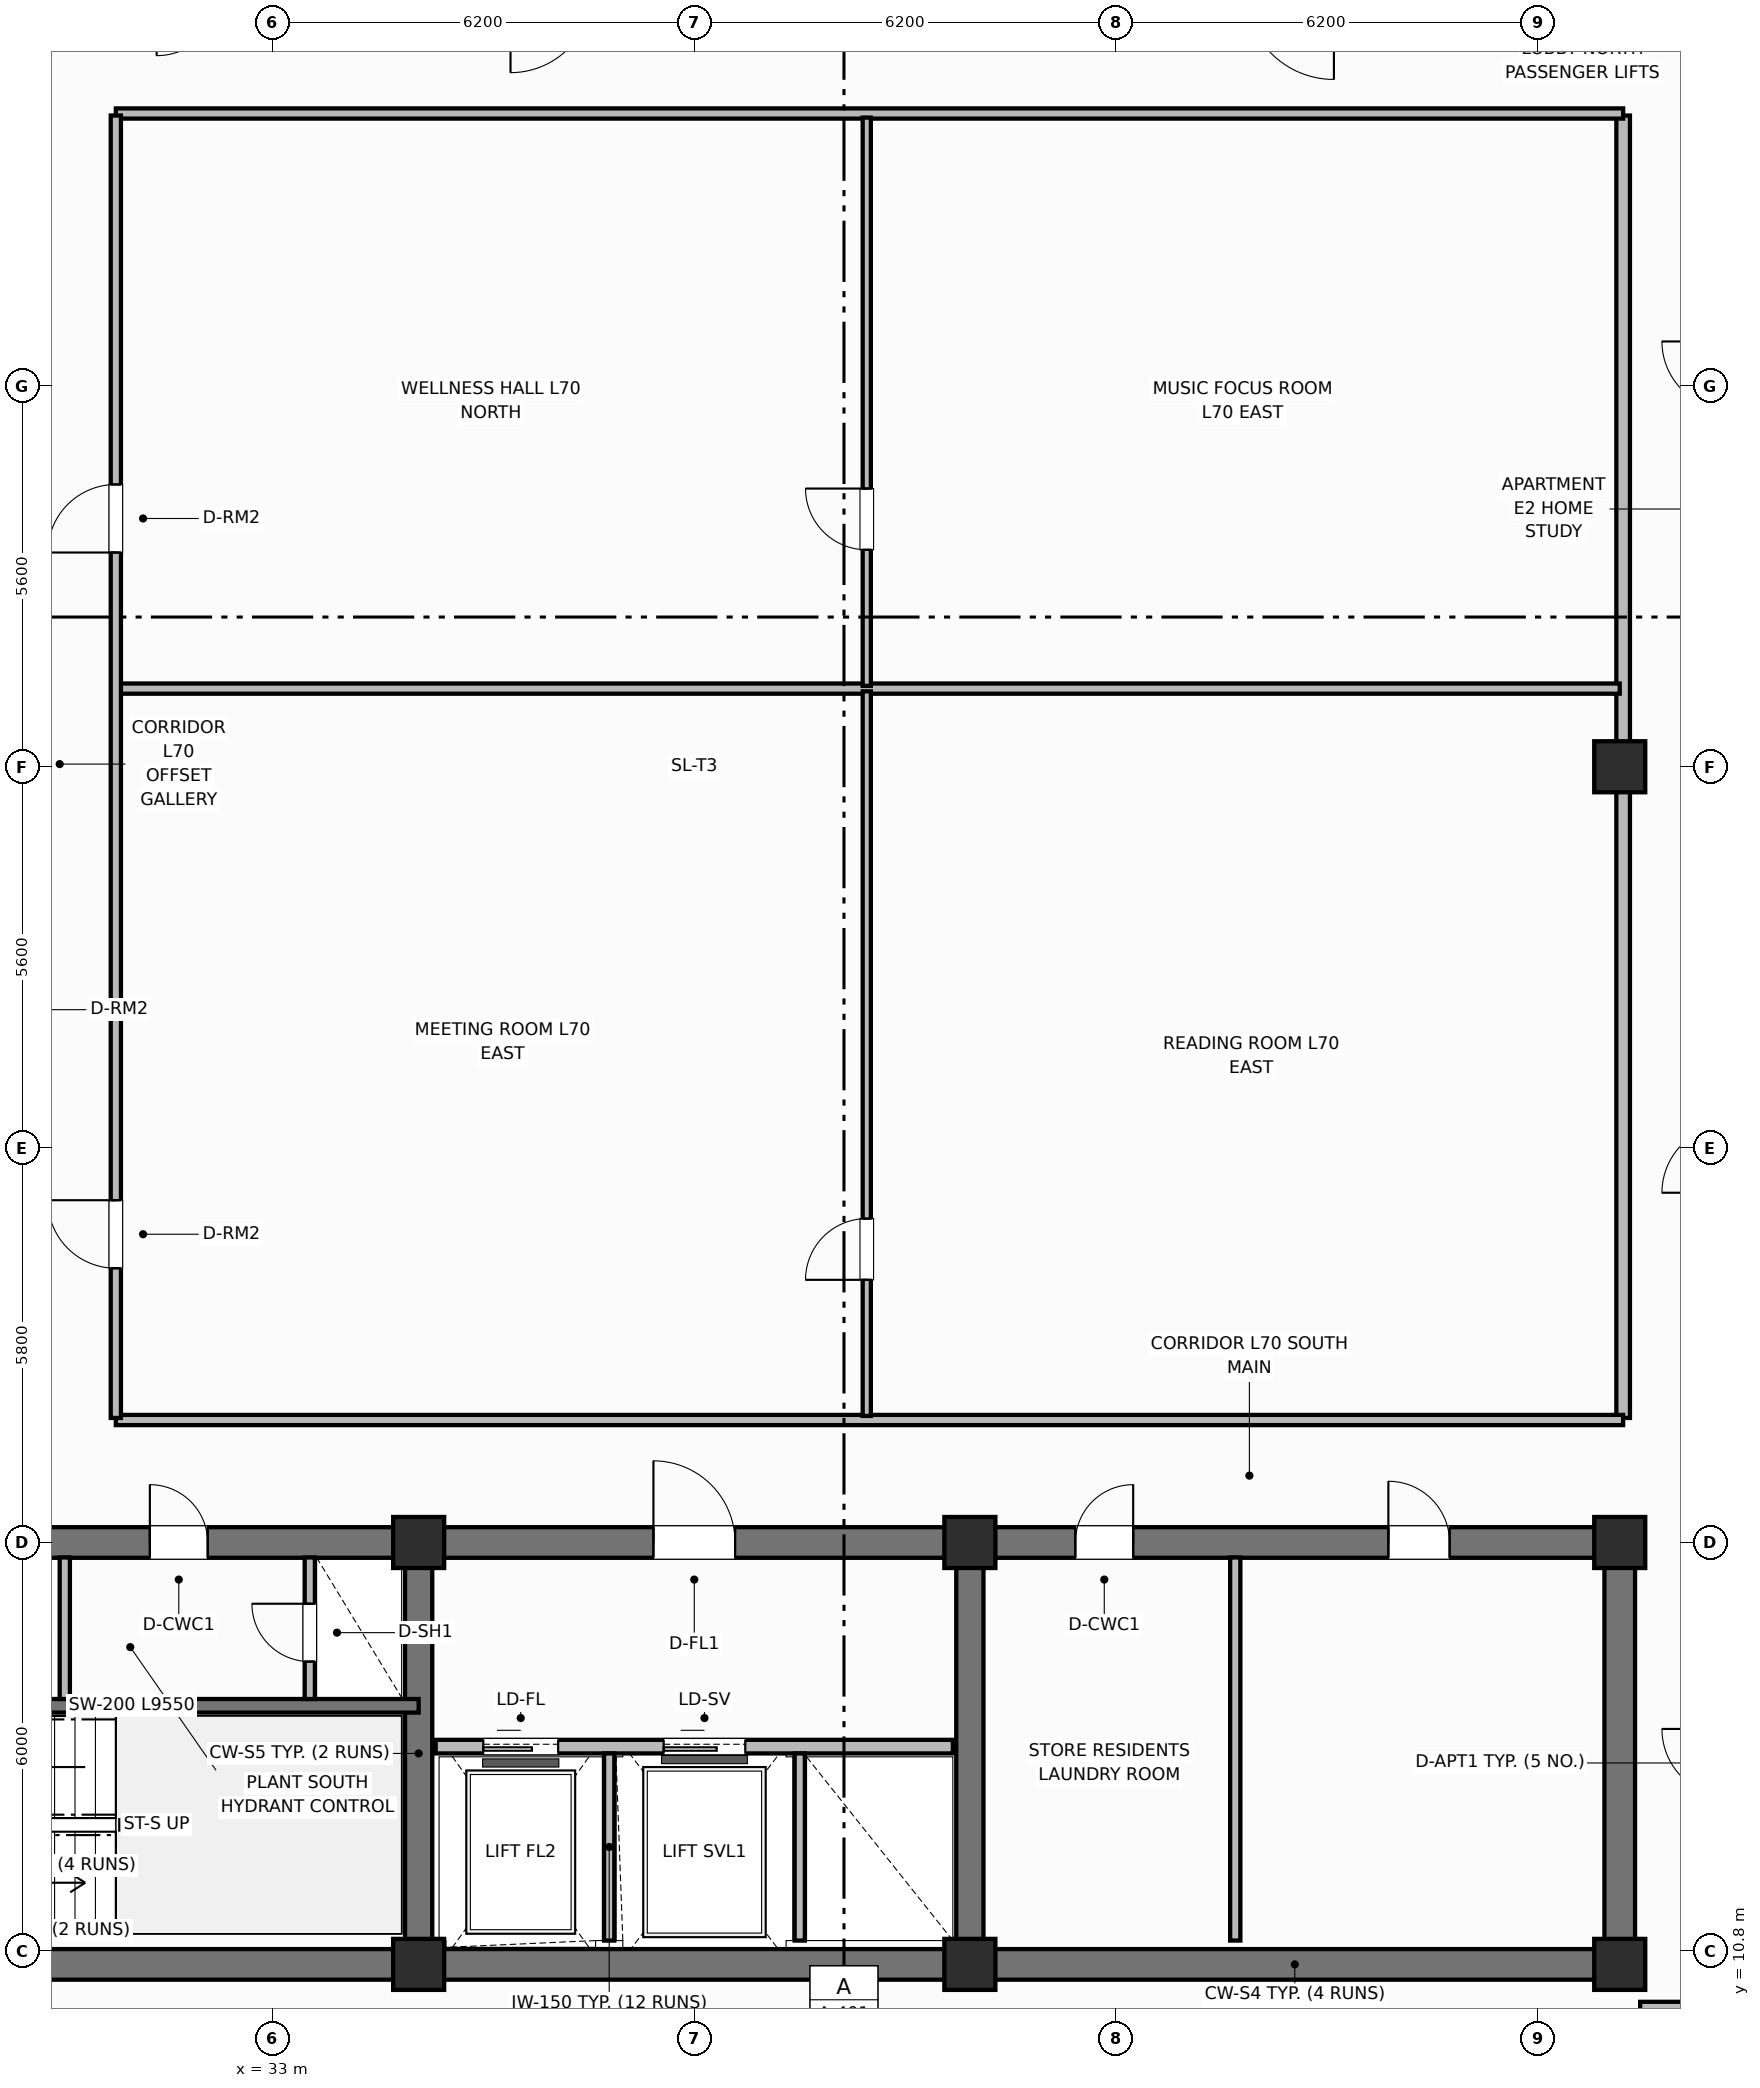
"""IFC4 building model, lengths in metres.
Left out: names, types, materials, properties, quantities, classifications, styles, units other than length and angle.
Written with IfcOpenShell. Run it as: python <this file> out.ifc"""

import sys

from ifc_helpers import new_model, si_unit, direction, frame, frame_2d, origin, origin_2d, place, context, subcontext, project, spatial, rectangle, extrude, element, fill, save


model = new_model("IFC4")
c1 = context("Model", 3, precision=1e-05, world=origin(), true_north=direction((0.0, 1.0)))
c2 = subcontext(c1, "Body", "Model", "MODEL_VIEW")
j1 = project(units=[si_unit("LENGTHUNIT", "METRE"), si_unit("PLANEANGLEUNIT", "RADIAN")], contexts=[c1])
p1 = place(None, origin())
s1 = spatial("IfcSite", under=j1, at=p1, CompositionType="ELEMENT")
p2 = place(p1, origin())
s2 = spatial("IfcBuilding", under=s1, at=p2, CompositionType="ELEMENT")
p3 = place(p2, frame((0.0, 0.0, 278.7)))
s3 = spatial("IfcBuildingStorey", under=s2, at=p3, CompositionType="ELEMENT", Elevation=278.7)
p4 = place(p3, frame((52.8, 10.6, 0.0), z_axis=(0.0, 0.0, 1.0), x_axis=(-1.0, 0.0, 0.0)))
e1 = element("IfcWall", 1, at=p4, inside=s3, PredefinedType="SHEAR", context=c2, shape_type="SweptSolid", body=[
    extrude(rectangle(XDim=27.2, YDim=0.45, at=frame_2d((13.6, 0.0))), origin(), (0.0, 0.0, 1.0), 3.7),
])
p5 = place(p3, frame((52.8, 10.825, 0.0), z_axis=(0.0, 0.0, 1.0), x_axis=(0.0, 1.0, 0.0)))
e2 = element("IfcWall", 2, at=p5, inside=s3, PredefinedType="SHEAR", context=c2, shape_type="SweptSolid", body=[
    extrude(rectangle(XDim=5.75, YDim=0.45, at=frame_2d((2.875, 0.0))), origin(), (0.0, 0.0, 1.0), 3.7),
])
p6 = place(p3, frame((25.6, 16.8, 0.0), z_axis=(0.0, 0.0, 1.0), x_axis=(1.0, 0.0, 0.0)))
e3 = element("IfcWall", 3, at=p6, inside=s3, PredefinedType="SHEAR", context=c2, shape_type="SweptSolid", body=[
    extrude(rectangle(XDim=27.2, YDim=0.45, at=frame_2d((13.6, 0.0))), origin(), (0.0, 0.0, 1.0), 3.7),
])
p7 = place(p6, frame((1.8, 0.0, 0.0)))
e4 = element("IfcOpeningElement", 4, at=p7, cuts=e3, PredefinedType="OPENING", context=c2, shape_type="SweptSolid", body=[
    extrude(rectangle(XDim=1.1, YDim=2.15, at=frame_2d((0.55, 1.075))), frame((0.0, 0.235, 0.0), z_axis=(0.0, -1.0, 0.0), x_axis=(1.0, 0.0, 0.0)), (0.0, 0.0, 1.0), 0.47),
])
p8 = place(p6, frame((5.6, 0.0, 0.0)))
e5 = element("IfcOpeningElement", 5, at=p8, cuts=e3, PredefinedType="OPENING", context=c2, shape_type="SweptSolid", body=[
    extrude(rectangle(XDim=0.85, YDim=2.1, at=frame_2d((0.425, 1.05))), frame((0.0, 0.235, 0.0), z_axis=(0.0, -1.0, 0.0), x_axis=(1.0, 0.0, 0.0)), (0.0, 0.0, 1.0), 0.47),
])
p9 = place(p6, frame((13.0, 0.0, 0.0)))
e6 = element("IfcOpeningElement", 6, at=p9, cuts=e3, PredefinedType="OPENING", context=c2, shape_type="SweptSolid", body=[
    extrude(rectangle(XDim=1.2, YDim=2.15, at=frame_2d((0.6, 1.075))), frame((0.0, 0.235, 0.0), z_axis=(0.0, -1.0, 0.0), x_axis=(1.0, 0.0, 0.0)), (0.0, 0.0, 1.0), 0.47),
])
p10 = place(p6, frame((19.2, 0.0, 0.0)))
e7 = element("IfcOpeningElement", 7, at=p10, cuts=e3, PredefinedType="OPENING", context=c2, shape_type="SweptSolid", body=[
    extrude(rectangle(XDim=0.85, YDim=2.1, at=frame_2d((0.425, 1.05))), frame((0.0, 0.235, 0.0), z_axis=(0.0, -1.0, 0.0), x_axis=(1.0, 0.0, 0.0)), (0.0, 0.0, 1.0), 0.47),
])
p11 = place(p6, frame((23.8, 0.0, 0.0)))
e8 = element("IfcOpeningElement", 8, at=p11, cuts=e3, PredefinedType="OPENING", context=c2, shape_type="SweptSolid", body=[
    extrude(rectangle(XDim=0.9, YDim=2.1, at=frame_2d((0.45, 1.05))), frame((0.0, 0.235, 0.0), z_axis=(0.0, -1.0, 0.0), x_axis=(1.0, 0.0, 0.0)), (0.0, 0.0, 1.0), 0.47),
])
for number, where, z_axis, x_axis in (
    (9, (35.15, 10.825, 0.0), (0.0, 0.0, 1.0), (0.0, 1.0, 0.0)),
    (10, (43.25, 10.825, 0.0), (0.0, 0.0, 1.0), (0.0, 1.0, 0.0)),
):
    element("IfcWall", number, at=place(p3, frame(where, z_axis=z_axis, x_axis=x_axis)), inside=s3, PredefinedType="SHEAR", context=c2, shape_type="SweptSolid", body=[
        extrude(rectangle(XDim=5.75, YDim=0.4, at=frame_2d((2.875, 0.0))), origin(), (0.0, 0.0, 1.0), 3.7),
    ])
for number, where, z_axis, x_axis in (
    (11, (35.15, 10.6, 0.0), (0.0, 0.0, 1.0), (1.0, 0.0, 0.0)),
    (12, (35.15, 16.8, 0.0), (0.0, 0.0, 1.0), (1.0, 0.0, 0.0)),
    (13, (43.25, 10.6, 0.0), (0.0, 0.0, 1.0), (1.0, 0.0, 0.0)),
    (14, (43.25, 16.8, 0.0), (0.0, 0.0, 1.0), (1.0, 0.0, 0.0)),
    (15, (52.8, 10.6, 0.0), (0.0, 0.0, 1.0), (1.0, 0.0, 0.0)),
    (16, (52.8, 16.8, 0.0), (0.0, 0.0, 1.0), (1.0, 0.0, 0.0)),
    (17, (52.8, 28.2, 0.0), (0.0, 0.0, 1.0), (1.0, 0.0, 0.0)),
):
    element("IfcColumn", number, at=place(p3, frame(where, z_axis=z_axis, x_axis=x_axis)), inside=s3, PredefinedType="COLUMN", context=c2, shape_type="SweptSolid", body=[
        extrude(rectangle(XDim=0.75, YDim=0.75, at=origin_2d()), origin(), (0.0, 0.0, 1.0), 3.7),
    ])
p12 = place(p3, frame((25.6, 14.4, 0.0), z_axis=(0.0, 0.0, 1.0), x_axis=(1.0, 0.0, 0.0)))
e18 = element("IfcWall", 18, at=p12, inside=s3, PredefinedType="SHEAR", context=c2, shape_type="SweptSolid", body=[
    extrude(rectangle(XDim=9.55, YDim=0.2, at=frame_2d((4.775, 0.0))), origin(), (0.0, 0.0, 1.0), 3.7),
])
p13 = place(p12, frame((1.05, 0.0, 0.0)))
e19 = element("IfcOpeningElement", 19, at=p13, cuts=e18, PredefinedType="OPENING", context=c2, shape_type="SweptSolid", body=[
    extrude(rectangle(XDim=1.1, YDim=2.15, at=frame_2d((0.55, 1.075))), frame((0.0, 0.11, 0.0), z_axis=(0.0, -1.0, 0.0), x_axis=(1.0, 0.0, 0.0)), (0.0, 0.0, 1.0), 0.22),
])
p14 = place(p3, frame((29.95, 14.5, 0.0), z_axis=(0.0, 0.0, 1.0), x_axis=(0.0, 1.0, 0.0)))
e20 = element("IfcWall", 20, at=p14, inside=s3, PredefinedType="PARTITIONING", context=c2, shape_type="SweptSolid", body=[
    extrude(rectangle(XDim=2.08, YDim=0.15, at=frame_2d((1.04, 0.0))), origin(), (0.0, 0.0, 1.0), 2.56),
])
p15 = place(p3, frame((33.55, 14.5, 0.0), z_axis=(0.0, 0.0, 1.0), x_axis=(0.0, 1.0, 0.0)))
e21 = element("IfcWall", 21, at=p15, inside=s3, PredefinedType="PARTITIONING", context=c2, shape_type="SweptSolid", body=[
    extrude(rectangle(XDim=2.08, YDim=0.15, at=frame_2d((1.04, 0.0))), origin(), (0.0, 0.0, 1.0), 2.56),
])
p16 = place(p15, frame((0.55, 0.0, 0.0)))
e22 = element("IfcOpeningElement", 22, at=p16, cuts=e21, PredefinedType="OPENING", context=c2, shape_type="SweptSolid", body=[
    extrude(rectangle(XDim=0.85, YDim=2.05, at=frame_2d((0.425, 1.025))), frame((0.0, 0.085, 0.0), z_axis=(0.0, -1.0, 0.0), x_axis=(1.0, 0.0, 0.0)), (0.0, 0.0, 1.0), 0.17),
])
p17 = place(p3, frame((35.4, 13.8, 0.0), z_axis=(0.0, 0.0, 1.0), x_axis=(1.0, 0.0, 0.0)))
e23 = element("IfcWall", 23, at=p17, inside=s3, PredefinedType="PARTITIONING", context=c2, shape_type="SweptSolid", body=[
    extrude(rectangle(XDim=7.6, YDim=0.2, at=frame_2d((3.8, 0.0))), origin(), (0.0, 0.0, 1.0), 2.33),
])
p18 = place(p17, frame((0.7, 0.0, 0.0)))
e24 = element("IfcOpeningElement", 24, at=p18, cuts=e23, PredefinedType="OPENING", context=c2, shape_type="SweptSolid", body=[
    extrude(rectangle(XDim=1.1, YDim=2.15, at=frame_2d((0.55, 1.075))), frame((0.0, 0.11, 0.0), z_axis=(0.0, -1.0, 0.0), x_axis=(1.0, 0.0, 0.0)), (0.0, 0.0, 1.0), 0.22),
])
p19 = place(p17, frame((3.35, 0.0, 0.0)))
e25 = element("IfcOpeningElement", 25, at=p19, cuts=e23, PredefinedType="OPENING", context=c2, shape_type="SweptSolid", body=[
    extrude(rectangle(XDim=1.2, YDim=2.15, at=frame_2d((0.6, 1.075))), frame((0.0, 0.11, 0.0), z_axis=(0.0, -1.0, 0.0), x_axis=(1.0, 0.0, 0.0)), (0.0, 0.0, 1.0), 0.22),
])
for number, where, z_axis, x_axis in (
    (26, (37.95, 10.95, 0.0), (0.0, 0.0, 1.0), (0.0, 1.0, 0.0)),
    (27, (40.75, 10.95, 0.0), (0.0, 0.0, 1.0), (0.0, 1.0, 0.0)),
):
    element("IfcWall", number, at=place(p3, frame(where, z_axis=z_axis, x_axis=x_axis)), inside=s3, PredefinedType="PARTITIONING", context=c2, shape_type="SweptSolid", body=[
        extrude(rectangle(XDim=2.75, YDim=0.15, at=frame_2d((1.375, 0.0))), origin(), (0.0, 0.0, 1.0), 2.56),
    ])
p20 = place(p3, frame((47.15, 10.95, 0.0), z_axis=(0.0, 0.0, 1.0), x_axis=(0.0, 1.0, 0.0)))
e28 = element("IfcWall", 28, at=p20, inside=s3, PredefinedType="PARTITIONING", context=c2, shape_type="SweptSolid", body=[
    extrude(rectangle(XDim=5.63, YDim=0.15, at=frame_2d((2.815, 0.0))), origin(), (0.0, 0.0, 1.0), 2.56),
])
p21 = place(p3, frame((52.85, 18.63, 0.0), z_axis=(0.0, 0.0, 1.0), x_axis=(0.0, 1.0, 0.0)))
e29 = element("IfcWall", 29, at=p21, inside=s3, PredefinedType="PARTITIONING", context=c2, shape_type="SweptSolid", body=[
    extrude(rectangle(XDim=19.14, YDim=0.2, at=frame_2d((9.57, 0.0))), origin(), (0.0, 0.0, 1.0), 2.56),
])
for number, where, z_axis, x_axis in (
    (30, (30.7, 18.6, 0.0), (0.0, 0.0, 1.0), (1.0, 0.0, 0.0)),
    (31, (30.7, 37.8, 0.0), (0.0, 0.0, 1.0), (1.0, 0.0, 0.0)),
):
    element("IfcWall", number, at=place(p3, frame(where, z_axis=z_axis, x_axis=x_axis)), inside=s3, PredefinedType="PARTITIONING", context=c2, shape_type="SweptSolid", body=[
        extrude(rectangle(XDim=22.15, YDim=0.15, at=frame_2d((11.075, 0.0))), origin(), (0.0, 0.0, 1.0), 2.56),
    ])
p22 = place(p3, frame((30.73, 29.348, 0.0), z_axis=(0.0, 0.0, 1.0), x_axis=(1.0, 0.0, 0.0)))
e32 = element("IfcWall", 32, at=p22, inside=s3, PredefinedType="PARTITIONING", context=c2, shape_type="SweptSolid", body=[
    extrude(rectangle(XDim=22.07, YDim=0.15, at=frame_2d((11.035, 0.0))), origin(), (0.0, 0.0, 1.0), 2.56),
])
p23 = place(p3, frame((41.735, 18.66, 0.0), z_axis=(0.0, 0.0, 1.0), x_axis=(0.0, 1.0, 0.0)))
e33 = element("IfcWall", 33, at=p23, inside=s3, PredefinedType="PARTITIONING", context=c2, shape_type="SweptSolid", body=[
    extrude(rectangle(XDim=10.648, YDim=0.12, at=frame_2d((5.324, 0.0))), origin(), (0.0, 0.0, 1.0), 2.56),
])
p24 = place(p23, frame((2.0, 0.0, 0.0)))
e34 = element("IfcOpeningElement", 34, at=p24, cuts=e33, PredefinedType="OPENING", context=c2, shape_type="SweptSolid", body=[
    extrude(rectangle(XDim=0.9, YDim=2.1, at=frame_2d((0.45, 1.05))), frame((0.0, 0.07, 0.0), z_axis=(0.0, -1.0, 0.0), x_axis=(1.0, 0.0, 0.0)), (0.0, 0.0, 1.0), 0.14),
])
p25 = place(p3, frame((41.735, 29.388, 0.0), z_axis=(0.0, 0.0, 1.0), x_axis=(0.0, 1.0, 0.0)))
e35 = element("IfcWall", 35, at=p25, inside=s3, PredefinedType="PARTITIONING", context=c2, shape_type="SweptSolid", body=[
    extrude(rectangle(XDim=8.352, YDim=0.12, at=frame_2d((4.176, 0.0))), origin(), (0.0, 0.0, 1.0), 2.56),
])
p26 = place(p25, frame((2.0, 0.0, 0.0)))
e36 = element("IfcOpeningElement", 36, at=p26, cuts=e35, PredefinedType="OPENING", context=c2, shape_type="SweptSolid", body=[
    extrude(rectangle(XDim=0.9, YDim=2.1, at=frame_2d((0.45, 1.05))), frame((0.0, 0.07, 0.0), z_axis=(0.0, -1.0, 0.0), x_axis=(1.0, 0.0, 0.0)), (0.0, 0.0, 1.0), 0.14),
])
p27 = place(p3, frame((30.7, 18.63, 0.0), z_axis=(0.0, 0.0, 1.0), x_axis=(0.0, 1.0, 0.0)))
e37 = element("IfcWall", 37, at=p27, inside=s3, PredefinedType="PARTITIONING", context=c2, shape_type="SweptSolid", body=[
    extrude(rectangle(XDim=19.14, YDim=0.15, at=frame_2d((9.57, 0.0))), origin(), (0.0, 0.0, 1.0), 2.56),
])
p28 = place(p27, frame((2.2, 0.0, 0.0)))
e38 = element("IfcOpeningElement", 38, at=p28, cuts=e37, PredefinedType="OPENING", context=c2, shape_type="SweptSolid", body=[
    extrude(rectangle(XDim=1.0, YDim=2.15, at=frame_2d((0.5, 1.075))), frame((0.0, 0.085, 0.0), z_axis=(0.0, -1.0, 0.0), x_axis=(1.0, 0.0, 0.0)), (0.0, 0.0, 1.0), 0.17),
])
p29 = place(p27, frame((12.719, 0.0, 0.0)))
e39 = element("IfcOpeningElement", 39, at=p29, cuts=e37, PredefinedType="OPENING", context=c2, shape_type="SweptSolid", body=[
    extrude(rectangle(XDim=1.0, YDim=2.15, at=frame_2d((0.5, 1.075))), frame((0.0, 0.085, 0.0), z_axis=(0.0, -1.0, 0.0), x_axis=(1.0, 0.0, 0.0)), (0.0, 0.0, 1.0), 0.17),
])
p30 = place(p3, frame((53.1, 9.95, 0.0), z_axis=(0.0, 0.0, 1.0), x_axis=(1.0, 0.0, 0.0)))
e40 = element("IfcWall", 40, at=p30, inside=s3, PredefinedType="PARTITIONING", context=c2, shape_type="SweptSolid", body=[
    extrude(rectangle(XDim=3.754, YDim=0.2, at=frame_2d((1.877, 0.0))), origin(), (0.0, 0.0, 1.0), 2.56),
])
p31 = place(p16, origin())
e41 = element("IfcDoor", 41, at=p31, inside=s3, OperationType="SINGLE_SWING_RIGHT", PredefinedType="TRAPDOOR", context=c2, shape_type="SweptSolid", body=[
    extrude(rectangle(XDim=0.85, YDim=2.05, at=frame_2d((0.425, 1.025))), frame((0.0, 0.025, 0.0), z_axis=(0.0, -1.0, 0.0), x_axis=(1.0, 0.0, 0.0)), (0.0, 0.0, 1.0), 0.05),
])
fill(e22, e41)
p32 = place(p18, origin())
e42 = element("IfcDoor", 42, at=p32, inside=s3, OperationType="SLIDING_TO_LEFT", PredefinedType="DOOR", context=c2, shape_type="SweptSolid", body=[
    extrude(rectangle(XDim=1.1, YDim=2.15, at=frame_2d((0.55, 1.075))), frame((0.0, 0.025, 0.0), z_axis=(0.0, -1.0, 0.0), x_axis=(1.0, 0.0, 0.0)), (0.0, 0.0, 1.0), 0.05),
])
fill(e24, e42)
p33 = place(p19, origin())
e43 = element("IfcDoor", 43, at=p33, inside=s3, OperationType="SLIDING_TO_LEFT", PredefinedType="DOOR", context=c2, shape_type="SweptSolid", body=[
    extrude(rectangle(XDim=1.2, YDim=2.15, at=frame_2d((0.6, 1.075))), frame((0.0, 0.025, 0.0), z_axis=(0.0, -1.0, 0.0), x_axis=(1.0, 0.0, 0.0)), (0.0, 0.0, 1.0), 0.05),
])
fill(e25, e43)
p34 = place(p24, origin())
e44 = element("IfcDoor", 44, at=p34, inside=s3, OperationType="SINGLE_SWING_LEFT", PredefinedType="DOOR", context=c2, shape_type="SweptSolid", body=[
    extrude(rectangle(XDim=0.9, YDim=2.1, at=frame_2d((0.45, 1.05))), frame((0.0, 0.025, 0.0), z_axis=(0.0, -1.0, 0.0), x_axis=(1.0, 0.0, 0.0)), (0.0, 0.0, 1.0), 0.05),
])
fill(e34, e44)
p35 = place(p26, origin())
e45 = element("IfcDoor", 45, at=p35, inside=s3, OperationType="SINGLE_SWING_RIGHT", PredefinedType="DOOR", context=c2, shape_type="SweptSolid", body=[
    extrude(rectangle(XDim=0.9, YDim=2.1, at=frame_2d((0.45, 1.05))), frame((0.0, 0.025, 0.0), z_axis=(0.0, -1.0, 0.0), x_axis=(1.0, 0.0, 0.0)), (0.0, 0.0, 1.0), 0.05),
])
fill(e36, e45)
p36 = place(p28, origin())
e46 = element("IfcDoor", 46, at=p36, inside=s3, OperationType="SINGLE_SWING_RIGHT", PredefinedType="DOOR", context=c2, shape_type="SweptSolid", body=[
    extrude(rectangle(XDim=1.0, YDim=2.15, at=frame_2d((0.5, 1.075))), frame((0.0, 0.025, 0.0), z_axis=(0.0, -1.0, 0.0), x_axis=(1.0, 0.0, 0.0)), (0.0, 0.0, 1.0), 0.05),
])
fill(e38, e46)
p37 = place(p29, origin())
e47 = element("IfcDoor", 47, at=p37, inside=s3, OperationType="SINGLE_SWING_LEFT", PredefinedType="DOOR", context=c2, shape_type="SweptSolid", body=[
    extrude(rectangle(XDim=1.0, YDim=2.15, at=frame_2d((0.5, 1.075))), frame((0.0, 0.025, 0.0), z_axis=(0.0, -1.0, 0.0), x_axis=(1.0, 0.0, 0.0)), (0.0, 0.0, 1.0), 0.05),
])
fill(e39, e47)
p38 = place(p8, origin())
e48 = element("IfcDoor", 48, at=p38, inside=s3, OperationType="SINGLE_SWING_LEFT", PredefinedType="DOOR", context=c2, shape_type="SweptSolid", body=[
    extrude(rectangle(XDim=0.85, YDim=2.1, at=frame_2d((0.425, 1.05))), frame((0.0, 0.025, 0.0), z_axis=(0.0, -1.0, 0.0), x_axis=(1.0, 0.0, 0.0)), (0.0, 0.0, 1.0), 0.05),
])
fill(e5, e48)
p39 = place(p9, origin())
e49 = element("IfcDoor", 49, at=p39, inside=s3, OperationType="SINGLE_SWING_LEFT", PredefinedType="DOOR", context=c2, shape_type="SweptSolid", body=[
    extrude(rectangle(XDim=1.2, YDim=2.15, at=frame_2d((0.6, 1.075))), frame((0.0, 0.025, 0.0), z_axis=(0.0, -1.0, 0.0), x_axis=(1.0, 0.0, 0.0)), (0.0, 0.0, 1.0), 0.05),
])
fill(e6, e49)
p40 = place(p10, origin())
e50 = element("IfcDoor", 50, at=p40, inside=s3, OperationType="SINGLE_SWING_RIGHT", PredefinedType="DOOR", context=c2, shape_type="SweptSolid", body=[
    extrude(rectangle(XDim=0.85, YDim=2.1, at=frame_2d((0.425, 1.05))), frame((0.0, 0.025, 0.0), z_axis=(0.0, -1.0, 0.0), x_axis=(1.0, 0.0, 0.0)), (0.0, 0.0, 1.0), 0.05),
])
fill(e7, e50)
p41 = place(p11, origin())
e51 = element("IfcDoor", 51, at=p41, inside=s3, OperationType="SINGLE_SWING_LEFT", PredefinedType="DOOR", context=c2, shape_type="SweptSolid", body=[
    extrude(rectangle(XDim=0.9, YDim=2.1, at=frame_2d((0.45, 1.05))), frame((0.0, 0.025, 0.0), z_axis=(0.0, -1.0, 0.0), x_axis=(1.0, 0.0, 0.0)), (0.0, 0.0, 1.0), 0.05),
])
fill(e8, e51)
save(model, sys.argv[1])
